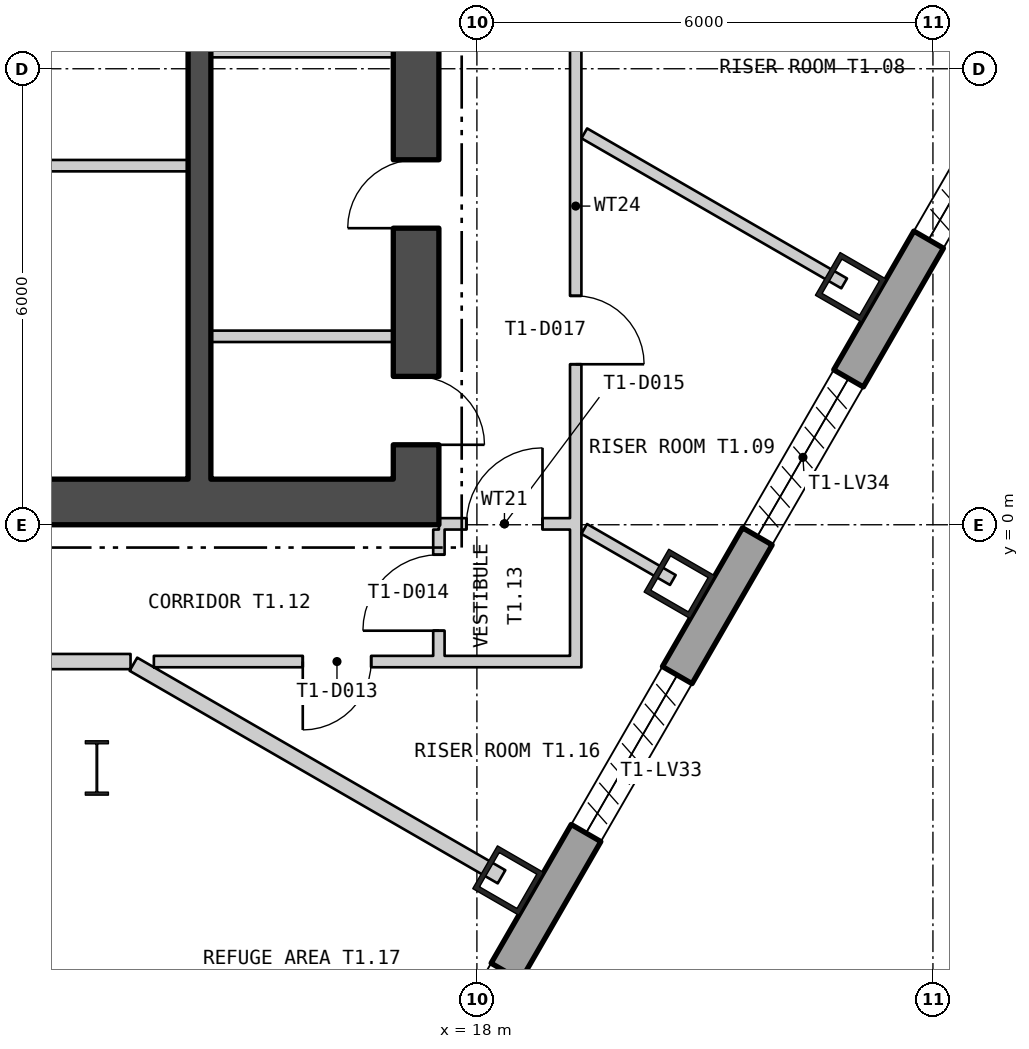
"""IFC4 building model, lengths in metres.
Left out: names, types, materials, properties, quantities, classifications, styles, units other than length and angle.
Written with IfcOpenShell. Run it as: python <this file> out.ifc"""

import sys

from ifc_helpers import new_model, si_unit, direction, frame, frame_2d, origin, origin_2d, place, context, subcontext, project, spatial, polyline, rectangle, hollow_rectangle, i_section, outline, extrude, element, fill, save


model = new_model("IFC4")
c1 = context("Model", 3, precision=1e-05, world=origin(), true_north=direction((0.0, 1.0)))
c2 = subcontext(c1, "Body", "Model", "MODEL_VIEW")
j1 = project(units=[si_unit("LENGTHUNIT", "METRE"), si_unit("PLANEANGLEUNIT", "RADIAN")], contexts=[c1])
p1 = place(None, origin())
s1 = spatial("IfcSite", under=j1, at=p1, CompositionType="ELEMENT")
p2 = place(p1, origin())
s2 = spatial("IfcBuilding", under=s1, at=p2, CompositionType="ELEMENT")
p3 = place(p2, frame((0.0, 0.0, 78.3)))
s3 = spatial("IfcBuildingStorey", under=s2, at=p3, CompositionType="ELEMENT", Elevation=78.3)
for number, where, z_axis, x_axis in (
    (1, (18.411, -4.681, 0.0), (0.0, 0.0, 1.0), (0.5, 0.866, 0.0)),
    (2, (20.665, -0.778, 0.0), (0.0, 0.0, 1.0), (0.5, 0.866, 0.0)),
    (3, (22.919, 3.126, 0.0), (0.0, 0.0, 1.0), (0.5, 0.866, 0.0)),
):
    element("IfcColumn", number, at=place(p3, frame(where, z_axis=z_axis, x_axis=x_axis)), inside=s3, PredefinedType="COLUMN", context=c2, shape_type="SweptSolid", body=[
        extrude(hollow_rectangle(XDim=0.65, YDim=0.7, WallThickness=0.065, at=origin_2d()), origin(), (0.0, 0.0, 1.0), 6.0),
    ])
p4 = place(p3, frame((13.0, -3.2, 0.0), z_axis=(0.0, 0.0, 1.0), x_axis=(1.0, 0.0, 0.0)))
e4 = element("IfcColumn", 4, at=p4, inside=s3, PredefinedType="COLUMN", context=c2, shape_type="SweptSolid", body=[
    extrude(i_section(OverallWidth=0.304, OverallDepth=0.716, WebThickness=0.021, FlangeThickness=0.04, at=origin_2d()), origin(), (0.0, 0.0, 1.0), 6.0),
])
p5 = place(p3, frame((5.22, -28.679, -0.18), z_axis=(0.0, 0.0, 1.0), x_axis=(0.500000711659, 0.866024992908, 0.0)))
e5 = element("IfcWall", 5, at=p5, inside=s3, PredefinedType="SOLIDWALL", context=c2, shape_type="SweptSolid", body=[
    extrude(outline(polyline([(-0.13, -0.225), (45.87, -0.225), (45.61, 0.225), (0.13, 0.225), (-0.13, -0.225)])), origin(), (0.0, 0.0, 1.0), 6.0),
])
p6 = place(p5, frame((1.424, 0.0, 1.38)))
e6 = element("IfcOpeningElement", 6, at=p6, cuts=e5, PredefinedType="OPENING", context=c2, shape_type="SweptSolid", body=[
    extrude(rectangle(XDim=2.4, YDim=3.6, at=frame_2d((1.2, 1.8))), frame((0.0, 0.235, 0.0), z_axis=(0.0, -1.0, 0.0), x_axis=(1.0, 0.0, 0.0)), (0.0, 0.0, 1.0), 0.47),
])
p7 = place(p5, frame((5.893, 0.0, 1.38)))
e7 = element("IfcOpeningElement", 7, at=p7, cuts=e5, PredefinedType="OPENING", context=c2, shape_type="SweptSolid", body=[
    extrude(rectangle(XDim=2.4, YDim=3.6, at=frame_2d((1.2, 1.8))), frame((0.0, 0.235, 0.0), z_axis=(0.0, -1.0, 0.0), x_axis=(1.0, 0.0, 0.0)), (0.0, 0.0, 1.0), 0.47),
])
p8 = place(p5, frame((10.401, 0.0, 1.38)))
e8 = element("IfcOpeningElement", 8, at=p8, cuts=e5, PredefinedType="OPENING", context=c2, shape_type="SweptSolid", body=[
    extrude(rectangle(XDim=2.4, YDim=3.6, at=frame_2d((1.2, 1.8))), frame((0.0, 0.235, 0.0), z_axis=(0.0, -1.0, 0.0), x_axis=(1.0, 0.0, 0.0)), (0.0, 0.0, 1.0), 0.47),
])
p9 = place(p5, frame((14.909, 0.0, 1.38)))
e9 = element("IfcOpeningElement", 9, at=p9, cuts=e5, PredefinedType="OPENING", context=c2, shape_type="SweptSolid", body=[
    extrude(rectangle(XDim=2.4, YDim=3.6, at=frame_2d((1.2, 1.8))), frame((0.0, 0.235, 0.0), z_axis=(0.0, -1.0, 0.0), x_axis=(1.0, 0.0, 0.0)), (0.0, 0.0, 1.0), 0.47),
])
p10 = place(p5, frame((19.416, 0.0, 1.38)))
e10 = element("IfcOpeningElement", 10, at=p10, cuts=e5, PredefinedType="OPENING", context=c2, shape_type="SweptSolid", body=[
    extrude(rectangle(XDim=2.4, YDim=3.6, at=frame_2d((1.2, 1.8))), frame((0.0, 0.235, 0.0), z_axis=(0.0, -1.0, 0.0), x_axis=(1.0, 0.0, 0.0)), (0.0, 0.0, 1.0), 0.47),
])
p11 = place(p5, frame((23.924, 0.0, 1.38)))
e11 = element("IfcOpeningElement", 11, at=p11, cuts=e5, PredefinedType="OPENING", context=c2, shape_type="SweptSolid", body=[
    extrude(rectangle(XDim=2.4, YDim=3.6, at=frame_2d((1.2, 1.8))), frame((0.0, 0.235, 0.0), z_axis=(0.0, -1.0, 0.0), x_axis=(1.0, 0.0, 0.0)), (0.0, 0.0, 1.0), 0.47),
])
p12 = place(p5, frame((28.431, 0.0, 1.38)))
e12 = element("IfcOpeningElement", 12, at=p12, cuts=e5, PredefinedType="OPENING", context=c2, shape_type="SweptSolid", body=[
    extrude(rectangle(XDim=2.4, YDim=3.6, at=frame_2d((1.2, 1.8))), frame((0.0, 0.235, 0.0), z_axis=(0.0, -1.0, 0.0), x_axis=(1.0, 0.0, 0.0)), (0.0, 0.0, 1.0), 0.47),
])
p13 = place(p5, frame((32.939, 0.0, 1.38)))
e13 = element("IfcOpeningElement", 13, at=p13, cuts=e5, PredefinedType="OPENING", context=c2, shape_type="SweptSolid", body=[
    extrude(rectangle(XDim=2.4, YDim=3.6, at=frame_2d((1.2, 1.8))), frame((0.0, 0.235, 0.0), z_axis=(0.0, -1.0, 0.0), x_axis=(1.0, 0.0, 0.0)), (0.0, 0.0, 1.0), 0.47),
])
p14 = place(p5, frame((37.447, 0.0, 1.38)))
e14 = element("IfcOpeningElement", 14, at=p14, cuts=e5, PredefinedType="OPENING", context=c2, shape_type="SweptSolid", body=[
    extrude(rectangle(XDim=2.4, YDim=3.6, at=frame_2d((1.2, 1.8))), frame((0.0, 0.235, 0.0), z_axis=(0.0, -1.0, 0.0), x_axis=(1.0, 0.0, 0.0)), (0.0, 0.0, 1.0), 0.47),
])
p15 = place(p5, frame((41.916, 0.0, 1.38)))
e15 = element("IfcOpeningElement", 15, at=p15, cuts=e5, PredefinedType="OPENING", context=c2, shape_type="SweptSolid", body=[
    extrude(rectangle(XDim=2.4, YDim=3.6, at=frame_2d((1.2, 1.8))), frame((0.0, 0.235, 0.0), z_axis=(0.0, -1.0, 0.0), x_axis=(1.0, 0.0, 0.0)), (0.0, 0.0, 1.0), 0.47),
])
p16 = place(p3, frame((-17.5, 0.3, 0.0), z_axis=(0.0, 0.0, 1.0), x_axis=(1.0, 0.0, 0.0)))
e16 = element("IfcWall", 16, at=p16, inside=s3, PredefinedType="SHEAR", context=c2, shape_type="SweptSolid", body=[
    extrude(rectangle(XDim=35.0, YDim=0.6, at=frame_2d((17.5, 0.0))), origin(), (0.0, 0.0, 1.0), 5.8),
])
p17 = place(p16, frame((12.0, 0.0, 0.0)))
e17 = element("IfcOpeningElement", 17, at=p17, cuts=e16, PredefinedType="OPENING", context=c2, shape_type="SweptSolid", body=[
    extrude(rectangle(XDim=1.8, YDim=2.4, at=frame_2d((0.9, 1.2))), frame((0.0, 0.31, 0.0), z_axis=(0.0, -1.0, 0.0), x_axis=(1.0, 0.0, 0.0)), (0.0, 0.0, 1.0), 0.62),
])
p18 = place(p16, frame((22.0, 0.0, 0.0)))
e18 = element("IfcOpeningElement", 18, at=p18, cuts=e16, PredefinedType="OPENING", context=c2, shape_type="SweptSolid", body=[
    extrude(rectangle(XDim=1.8, YDim=2.4, at=frame_2d((0.9, 1.2))), frame((0.0, 0.31, 0.0), z_axis=(0.0, -1.0, 0.0), x_axis=(1.0, 0.0, 0.0)), (0.0, 0.0, 1.0), 0.62),
])
p19 = place(p3, frame((17.2, 0.6, 0.0), z_axis=(0.0, 0.0, 1.0), x_axis=(0.0, 1.0, 0.0)))
e19 = element("IfcWall", 19, at=p19, inside=s3, PredefinedType="SHEAR", context=c2, shape_type="SweptSolid", body=[
    extrude(rectangle(XDim=16.8, YDim=0.6, at=frame_2d((8.4, 0.0))), origin(), (0.0, 0.0, 1.0), 5.8),
])
p20 = place(p19, frame((5.7, 0.0, 0.0)))
e20 = element("IfcOpeningElement", 20, at=p20, cuts=e19, PredefinedType="OPENING", context=c2, shape_type="SweptSolid", body=[
    extrude(rectangle(XDim=1.5, YDim=2.1, at=frame_2d((0.75, 1.05))), frame((0.0, 0.31, 0.0), z_axis=(0.0, -1.0, 0.0), x_axis=(1.0, 0.0, 0.0)), (0.0, 0.0, 1.0), 0.62),
])
p21 = place(p19, frame((0.452, 0.0, 0.0)))
e21 = element("IfcOpeningElement", 21, at=p21, cuts=e19, PredefinedType="OPENING", context=c2, shape_type="SweptSolid", body=[
    extrude(rectangle(XDim=0.9, YDim=2.1, at=frame_2d((0.45, 1.05))), frame((0.0, 0.31, 0.0), z_axis=(0.0, -1.0, 0.0), x_axis=(1.0, 0.0, 0.0)), (0.0, 0.0, 1.0), 0.62),
])
p22 = place(p19, frame((3.302, 0.0, 0.0)))
e22 = element("IfcOpeningElement", 22, at=p22, cuts=e19, PredefinedType="OPENING", context=c2, shape_type="SweptSolid", body=[
    extrude(rectangle(XDim=0.9, YDim=2.1, at=frame_2d((0.45, 1.05))), frame((0.0, 0.31, 0.0), z_axis=(0.0, -1.0, 0.0), x_axis=(1.0, 0.0, 0.0)), (0.0, 0.0, 1.0), 0.62),
])
p23 = place(p19, frame((10.697, 0.0, 0.0)))
e23 = element("IfcOpeningElement", 23, at=p23, cuts=e19, PredefinedType="OPENING", context=c2, shape_type="SweptSolid", body=[
    extrude(rectangle(XDim=0.9, YDim=2.1, at=frame_2d((0.45, 1.05))), frame((0.0, 0.31, 0.0), z_axis=(0.0, -1.0, 0.0), x_axis=(1.0, 0.0, 0.0)), (0.0, 0.0, 1.0), 0.62),
])
p24 = place(p19, frame((15.4, 0.0, 0.0)))
e24 = element("IfcOpeningElement", 24, at=p24, cuts=e19, PredefinedType="OPENING", context=c2, shape_type="SweptSolid", body=[
    extrude(rectangle(XDim=1.0, YDim=2.1, at=frame_2d((0.5, 1.05))), frame((0.0, 0.31, 0.0), z_axis=(0.0, -1.0, 0.0), x_axis=(1.0, 0.0, 0.0)), (0.0, 0.0, 1.0), 0.62),
])
p25 = place(p3, frame((14.35, 0.6, 0.0), z_axis=(0.0, 0.0, 1.0), x_axis=(0.0, 1.0, 0.0)))
e25 = element("IfcWall", 25, at=p25, inside=s3, PredefinedType="SHEAR", context=c2, shape_type="SweptSolid", body=[
    extrude(rectangle(XDim=16.8, YDim=0.3, at=frame_2d((8.4, 0.0))), origin(), (0.0, 0.0, 1.0), 5.8),
])
p26 = place(p25, frame((5.7, 0.0, 0.0)))
e26 = element("IfcOpeningElement", 26, at=p26, cuts=e25, PredefinedType="OPENING", context=c2, shape_type="SweptSolid", body=[
    extrude(rectangle(XDim=1.5, YDim=2.1, at=frame_2d((0.75, 1.05))), frame((0.0, 0.16, 0.0), z_axis=(0.0, -1.0, 0.0), x_axis=(1.0, 0.0, 0.0)), (0.0, 0.0, 1.0), 0.32),
])
p27 = place(p3, frame((11.0, 4.725, 0.0), z_axis=(0.0, 0.0, 1.0), x_axis=(1.0, 0.0, 0.0)))
e27 = element("IfcWall", 27, at=p27, inside=s3, PredefinedType="PARTITIONING", context=c2, shape_type="SweptSolid", body=[
    extrude(rectangle(XDim=3.2, YDim=0.15, at=frame_2d((1.6, 0.0))), origin(), (0.0, 0.0, 1.0), 5.8),
])
for number, where, z_axis, x_axis in (
    (28, (14.5, 6.225, 0.0), (0.0, 0.0, 1.0), (1.0, 0.0, 0.0)),
    (29, (14.5, 2.479, 0.0), (0.0, 0.0, 1.0), (1.0, 0.0, 0.0)),
):
    element("IfcWall", number, at=place(p3, frame(where, z_axis=z_axis, x_axis=x_axis)), inside=s3, PredefinedType="PARTITIONING", context=c2, shape_type="SweptSolid", body=[
        extrude(rectangle(XDim=2.4, YDim=0.15, at=frame_2d((1.2, 0.0))), origin(), (0.0, 0.0, 1.0), 5.8),
    ])
p28 = place(p3, frame((7.593, -3.641, 0.0), z_axis=(0.0, 0.0, 1.0), x_axis=(0.866059708757, -0.499940577336, 0.0)))
e30 = element("IfcWall", 30, at=p28, inside=s3, PredefinedType="PARTITIONING", context=c2, shape_type="SweptSolid", body=[
    extrude(rectangle(XDim=9.789, YDim=0.2, at=frame_2d((4.895, 0.0))), origin(), (0.0, 0.0, 1.0), 5.8),
])
p29 = place(p3, frame((7.68, -1.8, 0.0), z_axis=(0.0, 0.0, 1.0), x_axis=(1.0, 0.0, 0.0)))
e31 = element("IfcWall", 31, at=p29, inside=s3, PredefinedType="PARTITIONING", context=c2, shape_type="SweptSolid", body=[
    extrude(rectangle(XDim=5.763, YDim=0.2, at=frame_2d((2.881, 0.0))), origin(), (0.0, 0.0, 1.0), 5.8),
])
p30 = place(p29, frame((2.219, 0.0, 0.0)))
e32 = element("IfcOpeningElement", 32, at=p30, cuts=e31, PredefinedType="OPENING", context=c2, shape_type="SweptSolid", body=[
    extrude(rectangle(XDim=1.1, YDim=2.1, at=frame_2d((0.55, 1.05))), frame((0.0, 0.11, 0.0), z_axis=(0.0, -1.0, 0.0), x_axis=(1.0, 0.0, 0.0)), (0.0, 0.0, 1.0), 0.22),
])
p31 = place(p3, frame((13.481, -1.835, 0.0), z_axis=(0.0, 0.0, 1.0), x_axis=(0.865956282224, -0.500119702949, 0.0)))
e33 = element("IfcWall", 33, at=p31, inside=s3, PredefinedType="PARTITIONING", context=c2, shape_type="SweptSolid", body=[
    extrude(rectangle(XDim=5.593, YDim=0.2, at=frame_2d((2.796, 0.0))), origin(), (0.0, 0.0, 1.0), 5.8),
])
p32 = place(p3, frame((13.75, -1.8, 0.0), z_axis=(0.0, 0.0, 1.0), x_axis=(1.0, 0.0, 0.0)))
e34 = element("IfcWall", 34, at=p32, inside=s3, PredefinedType="PARTITIONING", context=c2, shape_type="SweptSolid", body=[
    extrude(rectangle(XDim=5.475, YDim=0.15, at=frame_2d((2.737, 0.0))), origin(), (0.0, 0.0, 1.0), 5.8),
])
p33 = place(p32, frame((1.959, 0.0, 0.0)))
e35 = element("IfcOpeningElement", 35, at=p33, cuts=e34, PredefinedType="OPENING", context=c2, shape_type="SweptSolid", body=[
    extrude(rectangle(XDim=0.9, YDim=2.1, at=frame_2d((0.45, 1.05))), frame((0.0, 0.085, 0.0), z_axis=(0.0, -1.0, 0.0), x_axis=(1.0, 0.0, 0.0)), (0.0, 0.0, 1.0), 0.17),
])
p34 = place(p3, frame((17.5, -1.725, 0.0), z_axis=(0.0, 0.0, 1.0), x_axis=(0.0, 1.0, 0.0)))
e36 = element("IfcWall", 36, at=p34, inside=s3, PredefinedType="PARTITIONING", context=c2, shape_type="SweptSolid", body=[
    extrude(rectangle(XDim=1.662, YDim=0.15, at=frame_2d((0.831, 0.0))), origin(), (0.0, 0.0, 1.0), 5.8),
])
p35 = place(p34, frame((0.331, 0.0, 0.0)))
e37 = element("IfcOpeningElement", 37, at=p35, cuts=e36, PredefinedType="OPENING", context=c2, shape_type="SweptSolid", body=[
    extrude(rectangle(XDim=1.0, YDim=2.1, at=frame_2d((0.5, 1.05))), frame((0.0, 0.085, 0.0), z_axis=(0.0, -1.0, 0.0), x_axis=(1.0, 0.0, 0.0)), (0.0, 0.0, 1.0), 0.17),
])
p36 = place(p3, frame((17.5, 0.012, 0.0), z_axis=(0.0, 0.0, 1.0), x_axis=(1.0, 0.0, 0.0)))
e38 = element("IfcWall", 38, at=p36, inside=s3, PredefinedType="PARTITIONING", context=c2, shape_type="SweptSolid", body=[
    extrude(rectangle(XDim=1.725, YDim=0.15, at=frame_2d((0.863, 0.0))), origin(), (0.0, 0.0, 1.0), 5.2),
])
p37 = place(p36, frame((0.363, 0.0, 0.0)))
e39 = element("IfcOpeningElement", 39, at=p37, cuts=e38, PredefinedType="OPENING", context=c2, shape_type="SweptSolid", body=[
    extrude(rectangle(XDim=1.0, YDim=2.1, at=frame_2d((0.5, 1.05))), frame((0.0, 0.085, 0.0), z_axis=(0.0, -1.0, 0.0), x_axis=(1.0, 0.0, 0.0)), (0.0, 0.0, 1.0), 0.17),
])
p38 = place(p3, frame((19.3, -1.875, 0.0), z_axis=(0.0, 0.0, 1.0), x_axis=(0.0, 1.0, 0.0)))
e40 = element("IfcWall", 40, at=p38, inside=s3, PredefinedType="PARTITIONING", context=c2, shape_type="SweptSolid", body=[
    extrude(rectangle(XDim=12.136, YDim=0.15, at=frame_2d((6.068, 0.0))), origin(), (0.0, 0.0, 1.0), 5.8),
])
p39 = place(p38, frame((3.987, 0.0, 0.0)))
e41 = element("IfcOpeningElement", 41, at=p39, cuts=e40, PredefinedType="OPENING", context=c2, shape_type="SweptSolid", body=[
    extrude(rectangle(XDim=0.9, YDim=2.1, at=frame_2d((0.45, 1.05))), frame((0.0, 0.085, 0.0), z_axis=(0.0, -1.0, 0.0), x_axis=(1.0, 0.0, 0.0)), (0.0, 0.0, 1.0), 0.17),
])
p40 = place(p38, frame((9.112, 0.0, 0.0)))
e42 = element("IfcOpeningElement", 42, at=p40, cuts=e40, PredefinedType="OPENING", context=c2, shape_type="SweptSolid", body=[
    extrude(rectangle(XDim=0.9, YDim=2.1, at=frame_2d((0.45, 1.05))), frame((0.0, 0.085, 0.0), z_axis=(0.0, -1.0, 0.0), x_axis=(1.0, 0.0, 0.0)), (0.0, 0.0, 1.0), 0.17),
])
p41 = place(p3, frame((19.412, -0.055, 0.0), z_axis=(0.0, 0.0, 1.0), x_axis=(0.866408170701, -0.499336441433, 0.0)))
e43 = element("IfcWall", 43, at=p41, inside=s3, PredefinedType="PARTITIONING", context=c2, shape_type="SweptSolid", body=[
    extrude(rectangle(XDim=1.346, YDim=0.15, at=frame_2d((0.673, 0.0))), origin(), (0.0, 0.0, 1.0), 5.8),
])
p42 = place(p3, frame((19.413, 5.15, 0.0), z_axis=(0.0, 0.0, 1.0), x_axis=(0.866021079084, -0.500007490527, 0.0)))
e44 = element("IfcWall", 44, at=p42, inside=s3, PredefinedType="PARTITIONING", context=c2, shape_type="SweptSolid", body=[
    extrude(rectangle(XDim=3.948, YDim=0.15, at=frame_2d((1.974, 0.0))), origin(), (0.0, 0.0, 1.0), 5.8),
])
p43 = place(p21, origin())
e45 = element("IfcDoor", 45, at=p43, inside=s3, OperationType="SINGLE_SWING_LEFT", PredefinedType="DOOR", context=c2, shape_type="SweptSolid", body=[
    extrude(rectangle(XDim=0.9, YDim=2.1, at=frame_2d((0.45, 1.05))), frame((0.0, 0.025, 0.0), z_axis=(0.0, -1.0, 0.0), x_axis=(1.0, 0.0, 0.0)), (0.0, 0.0, 1.0), 0.05),
])
fill(e21, e45)
p44 = place(p22, origin())
e46 = element("IfcDoor", 46, at=p44, inside=s3, OperationType="SINGLE_SWING_RIGHT", PredefinedType="DOOR", context=c2, shape_type="SweptSolid", body=[
    extrude(rectangle(XDim=0.9, YDim=2.1, at=frame_2d((0.45, 1.05))), frame((0.0, 0.025, 0.0), z_axis=(0.0, -1.0, 0.0), x_axis=(1.0, 0.0, 0.0)), (0.0, 0.0, 1.0), 0.05),
])
fill(e22, e46)
p45 = place(p33, origin())
e47 = element("IfcDoor", 47, at=p45, inside=s3, OperationType="SINGLE_SWING_LEFT", PredefinedType="DOOR", context=c2, shape_type="SweptSolid", body=[
    extrude(rectangle(XDim=0.9, YDim=2.1, at=frame_2d((0.45, 1.05))), frame((0.0, 0.025, 0.0), z_axis=(0.0, -1.0, 0.0), x_axis=(1.0, 0.0, 0.0)), (0.0, 0.0, 1.0), 0.05),
])
fill(e35, e47)
p46 = place(p35, origin())
e48 = element("IfcDoor", 48, at=p46, inside=s3, OperationType="SINGLE_SWING_RIGHT", PredefinedType="DOOR", context=c2, shape_type="SweptSolid", body=[
    extrude(rectangle(XDim=1.0, YDim=2.1, at=frame_2d((0.5, 1.05))), frame((0.0, 0.025, 0.0), z_axis=(0.0, -1.0, 0.0), x_axis=(1.0, 0.0, 0.0)), (0.0, 0.0, 1.0), 0.05),
])
fill(e37, e48)
p47 = place(p37, origin())
e49 = element("IfcDoor", 49, at=p47, inside=s3, OperationType="SINGLE_SWING_LEFT", PredefinedType="DOOR", context=c2, shape_type="SweptSolid", body=[
    extrude(rectangle(XDim=1.0, YDim=2.1, at=frame_2d((0.5, 1.05))), frame((0.0, 0.025, 0.0), z_axis=(0.0, -1.0, 0.0), x_axis=(1.0, 0.0, 0.0)), (0.0, 0.0, 1.0), 0.05),
])
fill(e39, e49)
p48 = place(p39, origin())
e50 = element("IfcDoor", 50, at=p48, inside=s3, OperationType="SINGLE_SWING_LEFT", PredefinedType="DOOR", context=c2, shape_type="SweptSolid", body=[
    extrude(rectangle(XDim=0.9, YDim=2.1, at=frame_2d((0.45, 1.05))), frame((0.0, 0.025, 0.0), z_axis=(0.0, -1.0, 0.0), x_axis=(1.0, 0.0, 0.0)), (0.0, 0.0, 1.0), 0.05),
])
fill(e41, e50)
save(model, sys.argv[1])
